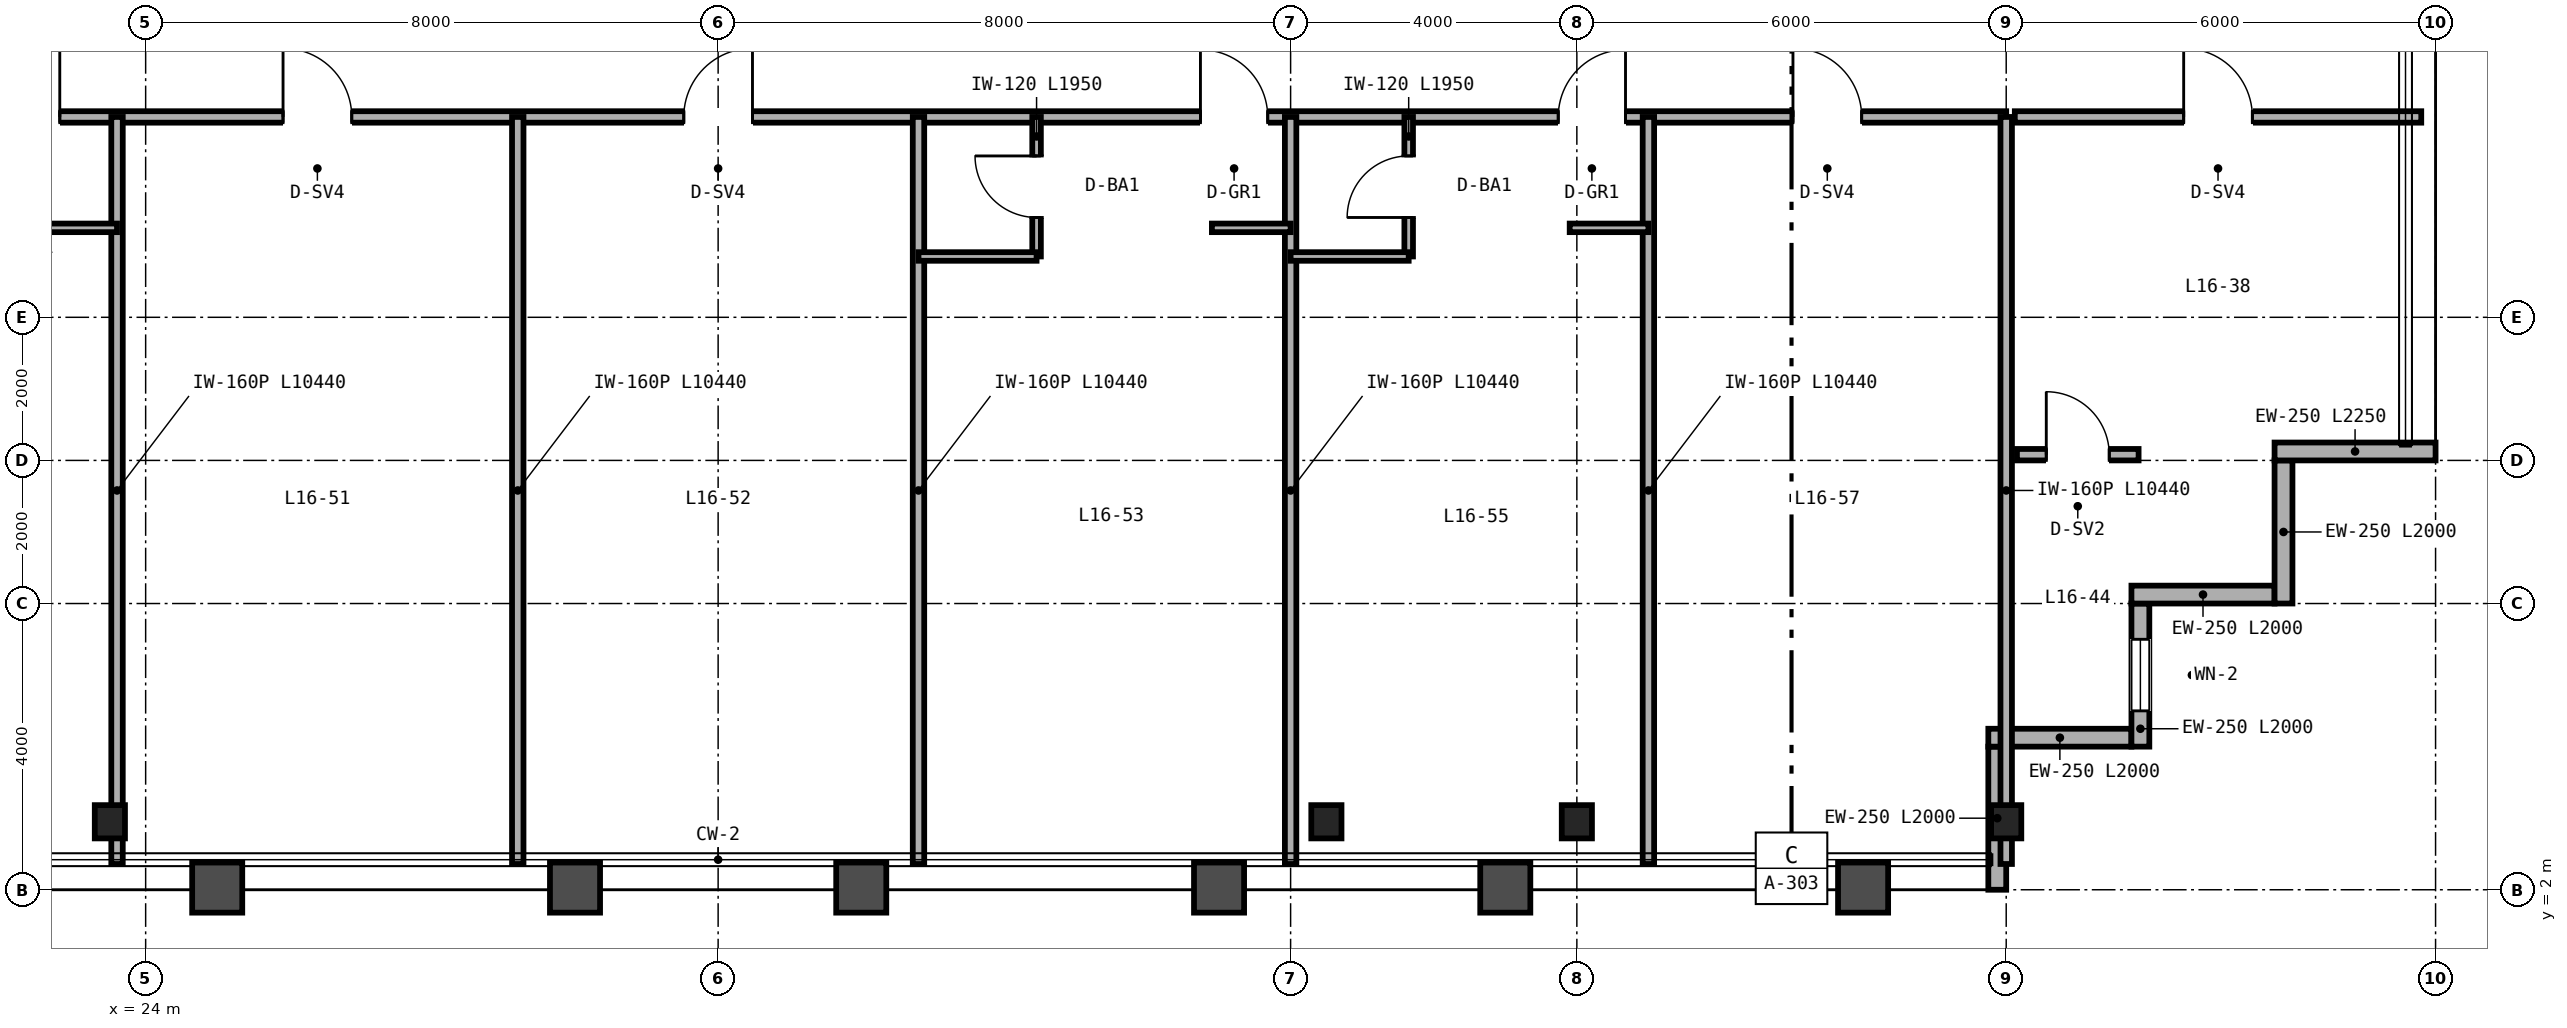
"""IFC4 building model, lengths in metres.
Left out: names, types, materials, properties, quantities, classifications, styles, units other than length and angle.
Written with IfcOpenShell. Run it as: python <this file> out.ifc"""

import sys

from ifc_helpers import new_model, si_unit, direction, frame, frame_2d, origin, origin_2d, place, context, subcontext, project, spatial, rectangle, i_section, extrude, source, transform, mapped, element, fill, save


model = new_model("IFC4")
c1 = context("Model", 3, precision=1e-05, world=origin(), true_north=direction((0.0, 1.0)))
c2 = subcontext(c1, "Body", "Model", "MODEL_VIEW")
j1 = project(units=[si_unit("LENGTHUNIT", "METRE"), si_unit("PLANEANGLEUNIT", "RADIAN")], contexts=[c1])
p1 = place(None, origin())
s1 = spatial("IfcSite", under=j1, at=p1, CompositionType="ELEMENT")
p2 = place(p1, origin())
s2 = spatial("IfcBuilding", under=s1, at=p2, CompositionType="ELEMENT")
p3 = place(p2, frame((0.0, 0.0, 67.2)))
s3 = spatial("IfcBuildingStorey", under=s2, at=p3, CompositionType="ELEMENT", Elevation=67.2)
m1 = source(origin(), c2, "Body", "SweptSolid", [
    extrude(i_section(OverallWidth=0.422, OverallDepth=0.465, WebThickness=0.045, FlangeThickness=0.073, FilletRadius=0.025, at=origin_2d()), origin(), (0.0, 0.0, 1.0), 3.35),
])
for number, where, z_axis, x_axis in (
    (1, (23.5, 2.95, 0.0), (0.0, 0.0, 1.0), (1.0, 0.0, 0.0)),
    (2, (40.5, 2.95, 0.0), (0.0, 0.0, 1.0), (1.0, 0.0, 0.0)),
    (3, (44.0, 2.95, 0.0), (0.0, 0.0, 1.0), (1.0, 0.0, 0.0)),
    (4, (50.0, 2.95, 0.0), (0.0, 0.0, 1.0), (1.0, 0.0, 0.0)),
):
    element("IfcColumn", number, at=place(p3, frame(where, z_axis=z_axis, x_axis=x_axis)), inside=s3, PredefinedType="COLUMN", context=c2, shape_type="MappedRepresentation", body=[
        mapped(m1, transform((0.0, 0.0, 0.0), scale=1.0)),
    ])
p4 = place(p3, frame((49.875, 2.0, 0.0), z_axis=(0.0, 0.0, 1.0), x_axis=(0.0, 1.0, 0.0)))
e5 = element("IfcWall", 5, at=p4, inside=s3, PredefinedType="SOLIDWALL", context=c2, shape_type="SweptSolid", body=[
    extrude(rectangle(XDim=2.0, YDim=0.25, at=frame_2d((1.0, 0.0))), origin(), (0.0, 0.0, 1.0), 2.657),
])
p5 = place(p3, frame((49.75, 4.125, 0.0), z_axis=(0.0, 0.0, 1.0), x_axis=(1.0, 0.0, 0.0)))
e6 = element("IfcWall", 6, at=p5, inside=s3, PredefinedType="SOLIDWALL", context=c2, shape_type="SweptSolid", body=[
    extrude(rectangle(XDim=2.0, YDim=0.25, at=frame_2d((1.0, 0.0))), origin(), (0.0, 0.0, 1.0), 3.35),
])
p6 = place(p3, frame((51.875, 4.0, 0.0), z_axis=(0.0, 0.0, 1.0), x_axis=(0.0, 1.0, 0.0)))
e7 = element("IfcWall", 7, at=p6, inside=s3, PredefinedType="SOLIDWALL", context=c2, shape_type="SweptSolid", body=[
    extrude(rectangle(XDim=2.0, YDim=0.25, at=frame_2d((1.0, 0.0))), origin(), (0.0, 0.0, 1.0), 3.35),
])
p7 = place(p6, frame((0.5, 0.0, 0.85)))
e8 = element("IfcOpeningElement", 8, at=p7, cuts=e7, PredefinedType="OPENING", context=c2, shape_type="SweptSolid", body=[
    extrude(rectangle(XDim=1.0, YDim=1.9, at=frame_2d((0.5, 0.95))), frame((0.0, 0.135, 0.0), z_axis=(0.0, -1.0, 0.0), x_axis=(1.0, 0.0, 0.0)), (0.0, 0.0, 1.0), 0.27),
])
for number, where, z_axis, x_axis in (
    (9, (51.75, 6.125, 0.0), (0.0, 0.0, 1.0), (1.0, 0.0, 0.0)),
    (10, (53.875, 6.0, 0.0), (0.0, 0.0, 1.0), (0.0, 1.0, 0.0)),
):
    element("IfcWall", number, at=place(p3, frame(where, z_axis=z_axis, x_axis=x_axis)), inside=s3, PredefinedType="SOLIDWALL", context=c2, shape_type="SweptSolid", body=[
        extrude(rectangle(XDim=2.0, YDim=0.25, at=frame_2d((1.0, 0.0))), origin(), (0.0, 0.0, 1.0), 3.35),
    ])
p8 = place(p3, frame((53.75, 8.125, 0.0), z_axis=(0.0, 0.0, 1.0), x_axis=(1.0, 0.0, 0.0)))
e11 = element("IfcWall", 11, at=p8, inside=s3, PredefinedType="SOLIDWALL", context=c2, shape_type="SweptSolid", body=[
    extrude(rectangle(XDim=2.25, YDim=0.25, at=frame_2d((1.125, 0.0))), origin(), (0.0, 0.0, 1.0), 3.35),
])
p9 = place(p3, frame((50.12, 12.8, 0.0), z_axis=(0.0, 0.0, 1.0), x_axis=(1.0, 0.0, 0.0)))
e12 = element("IfcWall", 12, at=p9, inside=s3, PredefinedType="PARTITIONING", context=c2, shape_type="SweptSolid", body=[
    extrude(rectangle(XDim=5.68, YDim=0.16, at=frame_2d((2.84, 0.0))), origin(), (0.0, 0.0, 1.0), 3.35),
])
p10 = place(p9, frame((2.36, 0.0, 0.0)))
e13 = element("IfcOpeningElement", 13, at=p10, cuts=e12, PredefinedType="OPENING", context=c2, shape_type="SweptSolid", body=[
    extrude(rectangle(XDim=0.96, YDim=2.15, at=frame_2d((0.48, 1.075))), frame((0.0, 0.09, 0.0), z_axis=(0.0, -1.0, 0.0), x_axis=(1.0, 0.0, 0.0)), (0.0, 0.0, 1.0), 0.18),
])
p11 = place(p3, frame((50.15, 8.08, 0.0), z_axis=(0.0, 0.0, 1.0), x_axis=(1.0, 0.0, 0.0)))
e14 = element("IfcWall", 14, at=p11, inside=s3, PredefinedType="PARTITIONING", context=c2, shape_type="SweptSolid", body=[
    extrude(rectangle(XDim=1.7, YDim=0.16, at=frame_2d((0.85, 0.0))), origin(), (0.0, 0.0, 1.0), 3.35),
])
p12 = place(p11, frame((0.41, 0.0, 0.0)))
e15 = element("IfcOpeningElement", 15, at=p12, cuts=e14, PredefinedType="OPENING", context=c2, shape_type="SweptSolid", body=[
    extrude(rectangle(XDim=0.88, YDim=2.15, at=frame_2d((0.44, 1.075))), frame((0.0, 0.09, 0.0), z_axis=(0.0, -1.0, 0.0), x_axis=(1.0, 0.0, 0.0)), (0.0, 0.0, 1.0), 0.18),
])
p13 = place(p3, frame((14.0, 12.8, 0.0), z_axis=(0.0, 0.0, 1.0), x_axis=(1.0, 0.0, 0.0)))
e16 = element("IfcWall", 16, at=p13, inside=s3, PredefinedType="PARTITIONING", context=c2, shape_type="SweptSolid", body=[
    extrude(rectangle(XDim=36.0, YDim=0.16, at=frame_2d((18.0, 0.0))), origin(), (0.0, 0.0, 1.0), 2.571),
])
p14 = place(p13, frame((3.54, 0.0, 0.0)))
e17 = element("IfcOpeningElement", 17, at=p14, cuts=e16, PredefinedType="OPENING", context=c2, shape_type="SweptSolid", body=[
    extrude(rectangle(XDim=0.94, YDim=2.15, at=frame_2d((0.47, 1.075))), frame((0.0, 0.09, 0.0), z_axis=(0.0, -1.0, 0.0), x_axis=(1.0, 0.0, 0.0)), (0.0, 0.0, 1.0), 0.18),
])
p15 = place(p13, frame((7.86, 0.0, 0.0)))
e18 = element("IfcOpeningElement", 18, at=p15, cuts=e16, PredefinedType="OPENING", context=c2, shape_type="SweptSolid", body=[
    extrude(rectangle(XDim=0.94, YDim=2.15, at=frame_2d((0.47, 1.075))), frame((0.0, 0.09, 0.0), z_axis=(0.0, -1.0, 0.0), x_axis=(1.0, 0.0, 0.0)), (0.0, 0.0, 1.0), 0.18),
])
p16 = place(p13, frame((11.92, 0.0, 0.0)))
e19 = element("IfcOpeningElement", 19, at=p16, cuts=e16, PredefinedType="OPENING", context=c2, shape_type="SweptSolid", body=[
    extrude(rectangle(XDim=0.96, YDim=2.15, at=frame_2d((0.48, 1.075))), frame((0.0, 0.09, 0.0), z_axis=(0.0, -1.0, 0.0), x_axis=(1.0, 0.0, 0.0)), (0.0, 0.0, 1.0), 0.18),
])
p17 = place(p13, frame((17.52, 0.0, 0.0)))
e20 = element("IfcOpeningElement", 20, at=p17, cuts=e16, PredefinedType="OPENING", context=c2, shape_type="SweptSolid", body=[
    extrude(rectangle(XDim=0.96, YDim=2.15, at=frame_2d((0.48, 1.075))), frame((0.0, 0.09, 0.0), z_axis=(0.0, -1.0, 0.0), x_axis=(1.0, 0.0, 0.0)), (0.0, 0.0, 1.0), 0.18),
])
p18 = place(p13, frame((24.74, 0.0, 0.0)))
e21 = element("IfcOpeningElement", 21, at=p18, cuts=e16, PredefinedType="OPENING", context=c2, shape_type="SweptSolid", body=[
    extrude(rectangle(XDim=0.94, YDim=2.15, at=frame_2d((0.47, 1.075))), frame((0.0, 0.09, 0.0), z_axis=(0.0, -1.0, 0.0), x_axis=(1.0, 0.0, 0.0)), (0.0, 0.0, 1.0), 0.18),
])
p19 = place(p13, frame((29.74, 0.0, 0.0)))
e22 = element("IfcOpeningElement", 22, at=p19, cuts=e16, PredefinedType="OPENING", context=c2, shape_type="SweptSolid", body=[
    extrude(rectangle(XDim=0.94, YDim=2.15, at=frame_2d((0.47, 1.075))), frame((0.0, 0.09, 0.0), z_axis=(0.0, -1.0, 0.0), x_axis=(1.0, 0.0, 0.0)), (0.0, 0.0, 1.0), 0.18),
])
p20 = place(p13, frame((33.02, 0.0, 0.0)))
e23 = element("IfcOpeningElement", 23, at=p20, cuts=e16, PredefinedType="OPENING", context=c2, shape_type="SweptSolid", body=[
    extrude(rectangle(XDim=0.96, YDim=2.15, at=frame_2d((0.48, 1.075))), frame((0.0, 0.09, 0.0), z_axis=(0.0, -1.0, 0.0), x_axis=(1.0, 0.0, 0.0)), (0.0, 0.0, 1.0), 0.18),
])
p21 = place(p3, frame((50.0, 2.36, 0.0), z_axis=(0.0, 0.0, 1.0), x_axis=(0.0, 1.0, 0.0)))
e24 = element("IfcWall", 24, at=p21, inside=s3, PredefinedType="PARTITIONING", context=c2, shape_type="SweptSolid", body=[
    extrude(rectangle(XDim=10.44, YDim=0.16, at=frame_2d((5.22, 0.0))), origin(), (0.0, 0.0, 1.0), 2.657),
])
p22 = place(p3, frame((23.6, 2.36, 0.0), z_axis=(0.0, 0.0, 1.0), x_axis=(0.0, 1.0, 0.0)))
e25 = element("IfcWall", 25, at=p22, inside=s3, PredefinedType="PARTITIONING", context=c2, shape_type="SweptSolid", body=[
    extrude(rectangle(XDim=10.44, YDim=0.16, at=frame_2d((5.22, 0.0))), origin(), (0.0, 0.0, 1.0), 2.423),
])
p23 = place(p3, frame((22.5, 11.25, 0.0), z_axis=(0.0, 0.0, 1.0), x_axis=(1.0, 0.0, 0.0)))
e26 = element("IfcWall", 26, at=p23, inside=s3, PredefinedType="PARTITIONING", context=c2, shape_type="SweptSolid", body=[
    extrude(rectangle(XDim=1.1, YDim=0.12, at=frame_2d((0.55, 0.0))), origin(), (0.0, 0.0, 1.0), 2.571),
])
for number, where, z_axis, x_axis in (
    (27, (29.2, 2.36, 0.0), (0.0, 0.0, 1.0), (0.0, 1.0, 0.0)),
    (28, (34.8, 2.36, 0.0), (0.0, 0.0, 1.0), (0.0, 1.0, 0.0)),
    (29, (40.0, 2.36, 0.0), (0.0, 0.0, 1.0), (0.0, 1.0, 0.0)),
):
    element("IfcWall", number, at=place(p3, frame(where, z_axis=z_axis, x_axis=x_axis)), inside=s3, PredefinedType="PARTITIONING", context=c2, shape_type="SweptSolid", body=[
        extrude(rectangle(XDim=10.44, YDim=0.16, at=frame_2d((5.22, 0.0))), origin(), (0.0, 0.0, 1.0), 2.423),
    ])
p24 = place(p3, frame((36.45, 10.85, 0.0), z_axis=(0.0, 0.0, 1.0), x_axis=(0.0, 1.0, 0.0)))
e30 = element("IfcWall", 30, at=p24, inside=s3, PredefinedType="PARTITIONING", context=c2, shape_type="SweptSolid", body=[
    extrude(rectangle(XDim=1.95, YDim=0.12, at=frame_2d((0.975, 0.0))), origin(), (0.0, 0.0, 1.0), 3.35),
])
p25 = place(p24, frame((0.545, 0.0, 0.0)))
e31 = element("IfcOpeningElement", 31, at=p25, cuts=e30, PredefinedType="OPENING", context=c2, shape_type="SweptSolid", body=[
    extrude(rectangle(XDim=0.86, YDim=2.1, at=frame_2d((0.43, 1.05))), frame((0.0, 0.07, 0.0), z_axis=(0.0, -1.0, 0.0), x_axis=(1.0, 0.0, 0.0)), (0.0, 0.0, 1.0), 0.14),
])
p26 = place(p3, frame((34.8, 10.85, 0.0), z_axis=(0.0, 0.0, 1.0), x_axis=(1.0, 0.0, 0.0)))
e32 = element("IfcWall", 32, at=p26, inside=s3, PredefinedType="PARTITIONING", context=c2, shape_type="SweptSolid", body=[
    extrude(rectangle(XDim=1.65, YDim=0.12, at=frame_2d((0.825, 0.0))), origin(), (0.0, 0.0, 1.0), 3.35),
])
p27 = place(p3, frame((38.9, 11.25, 0.0), z_axis=(0.0, 0.0, 1.0), x_axis=(1.0, 0.0, 0.0)))
e33 = element("IfcWall", 33, at=p27, inside=s3, PredefinedType="PARTITIONING", context=c2, shape_type="SweptSolid", body=[
    extrude(rectangle(XDim=1.1, YDim=0.12, at=frame_2d((0.55, 0.0))), origin(), (0.0, 0.0, 1.0), 3.35),
])
p28 = place(p3, frame((45.0, 2.36, 0.0), z_axis=(0.0, 0.0, 1.0), x_axis=(0.0, 1.0, 0.0)))
e34 = element("IfcWall", 34, at=p28, inside=s3, PredefinedType="PARTITIONING", context=c2, shape_type="SweptSolid", body=[
    extrude(rectangle(XDim=10.44, YDim=0.16, at=frame_2d((5.22, 0.0))), origin(), (0.0, 0.0, 1.0), 2.657),
])
p29 = place(p3, frame((41.65, 10.85, 0.0), z_axis=(0.0, 0.0, 1.0), x_axis=(0.0, 1.0, 0.0)))
e35 = element("IfcWall", 35, at=p29, inside=s3, PredefinedType="PARTITIONING", context=c2, shape_type="SweptSolid", body=[
    extrude(rectangle(XDim=1.95, YDim=0.12, at=frame_2d((0.975, 0.0))), origin(), (0.0, 0.0, 1.0), 3.35),
])
p30 = place(p29, frame((0.545, 0.0, 0.0)))
e36 = element("IfcOpeningElement", 36, at=p30, cuts=e35, PredefinedType="OPENING", context=c2, shape_type="SweptSolid", body=[
    extrude(rectangle(XDim=0.86, YDim=2.1, at=frame_2d((0.43, 1.05))), frame((0.0, 0.07, 0.0), z_axis=(0.0, -1.0, 0.0), x_axis=(1.0, 0.0, 0.0)), (0.0, 0.0, 1.0), 0.14),
])
p31 = place(p3, frame((40.0, 10.85, 0.0), z_axis=(0.0, 0.0, 1.0), x_axis=(1.0, 0.0, 0.0)))
e37 = element("IfcWall", 37, at=p31, inside=s3, PredefinedType="PARTITIONING", context=c2, shape_type="SweptSolid", body=[
    extrude(rectangle(XDim=1.65, YDim=0.12, at=frame_2d((0.825, 0.0))), origin(), (0.0, 0.0, 1.0), 2.571),
])
p32 = place(p3, frame((43.9, 11.25, 0.0), z_axis=(0.0, 0.0, 1.0), x_axis=(1.0, 0.0, 0.0)))
e38 = element("IfcWall", 38, at=p32, inside=s3, PredefinedType="PARTITIONING", context=c2, shape_type="SweptSolid", body=[
    extrude(rectangle(XDim=1.1, YDim=0.12, at=frame_2d((0.55, 0.0))), origin(), (0.0, 0.0, 1.0), 3.35),
])
m2 = source(origin(), c2, "Body", "SweptSolid", [
    extrude(rectangle(XDim=1.0, YDim=1.9, at=frame_2d((0.5, 0.95))), frame((0.0, 0.03, 0.0), z_axis=(0.0, -1.0, 0.0), x_axis=(1.0, 0.0, 0.0)), (0.0, 0.0, 1.0), 0.06),
])
p33 = place(p7, origin())
e39 = element("IfcWindow", 39, at=p33, inside=s3, PartitioningType="SINGLE_PANEL", PredefinedType="WINDOW", context=c2, shape_type="MappedRepresentation", body=[
    mapped(m2, transform((0.0, 0.0, 0.0), scale=1.0)),
])
fill(e8, e39)
m3 = source(origin(), c2, "Body", "SweptSolid", [
    extrude(rectangle(XDim=0.96, YDim=2.15, at=frame_2d((0.48, 1.075))), frame((0.0, 0.025, 0.0), z_axis=(0.0, -1.0, 0.0), x_axis=(1.0, 0.0, 0.0)), (0.0, 0.0, 1.0), 0.05),
])
p34 = place(p10, origin())
e40 = element("IfcDoor", 40, at=p34, inside=s3, OperationType="SINGLE_SWING_LEFT", PredefinedType="DOOR", context=c2, shape_type="MappedRepresentation", body=[
    mapped(m3, transform((0.0, 0.0, 0.0), scale=1.0)),
])
fill(e13, e40)
m4 = source(origin(), c2, "Body", "SweptSolid", [
    extrude(rectangle(XDim=0.88, YDim=2.15, at=frame_2d((0.44, 1.075))), frame((0.0, 0.025, 0.0), z_axis=(0.0, -1.0, 0.0), x_axis=(1.0, 0.0, 0.0)), (0.0, 0.0, 1.0), 0.05),
])
p35 = place(p12, origin())
e41 = element("IfcDoor", 41, at=p35, inside=s3, OperationType="SINGLE_SWING_LEFT", PredefinedType="DOOR", context=c2, shape_type="MappedRepresentation", body=[
    mapped(m4, transform((0.0, 0.0, 0.0), scale=1.0)),
])
fill(e15, e41)
m5 = source(origin(), c2, "Body", "SweptSolid", [
    extrude(rectangle(XDim=0.86, YDim=2.1, at=frame_2d((0.43, 1.05))), frame((0.0, 0.025, 0.0), z_axis=(0.0, -1.0, 0.0), x_axis=(1.0, 0.0, 0.0)), (0.0, 0.0, 1.0), 0.05),
])
p36 = place(p25, origin())
e42 = element("IfcDoor", 42, at=p36, inside=s3, OperationType="SINGLE_SWING_RIGHT", PredefinedType="DOOR", context=c2, shape_type="MappedRepresentation", body=[
    mapped(m5, transform((0.0, 0.0, 0.0), scale=1.0)),
])
fill(e31, e42)
p37 = place(p30, origin())
e43 = element("IfcDoor", 43, at=p37, inside=s3, OperationType="SINGLE_SWING_LEFT", PredefinedType="DOOR", context=c2, shape_type="MappedRepresentation", body=[
    mapped(m5, transform((0.0, 0.0, 0.0), scale=1.0)),
])
fill(e36, e43)
m6 = source(origin(), c2, "Body", "SweptSolid", [
    extrude(rectangle(XDim=0.94, YDim=2.15, at=frame_2d((0.47, 1.075))), frame((0.0, 0.025, 0.0), z_axis=(0.0, -1.0, 0.0), x_axis=(1.0, 0.0, 0.0)), (0.0, 0.0, 1.0), 0.05),
])
p38 = place(p15, origin())
e44 = element("IfcDoor", 44, at=p38, inside=s3, OperationType="SINGLE_SWING_RIGHT", PredefinedType="DOOR", context=c2, shape_type="MappedRepresentation", body=[
    mapped(m6, transform((0.0, 0.0, 0.0), scale=1.0)),
])
fill(e18, e44)
p39 = place(p16, origin())
e45 = element("IfcDoor", 45, at=p39, inside=s3, OperationType="SINGLE_SWING_LEFT", PredefinedType="DOOR", context=c2, shape_type="MappedRepresentation", body=[
    mapped(m3, transform((0.0, 0.0, 0.0), scale=1.0)),
])
fill(e19, e45)
p40 = place(p17, origin())
e46 = element("IfcDoor", 46, at=p40, inside=s3, OperationType="SINGLE_SWING_RIGHT", PredefinedType="DOOR", context=c2, shape_type="MappedRepresentation", body=[
    mapped(m3, transform((0.0, 0.0, 0.0), scale=1.0)),
])
fill(e20, e46)
p41 = place(p18, origin())
e47 = element("IfcDoor", 47, at=p41, inside=s3, OperationType="SINGLE_SWING_LEFT", PredefinedType="DOOR", context=c2, shape_type="MappedRepresentation", body=[
    mapped(m6, transform((0.0, 0.0, 0.0), scale=1.0)),
])
fill(e21, e47)
p42 = place(p19, origin())
e48 = element("IfcDoor", 48, at=p42, inside=s3, OperationType="SINGLE_SWING_RIGHT", PredefinedType="DOOR", context=c2, shape_type="MappedRepresentation", body=[
    mapped(m6, transform((0.0, 0.0, 0.0), scale=1.0)),
])
fill(e22, e48)
p43 = place(p20, origin())
e49 = element("IfcDoor", 49, at=p43, inside=s3, OperationType="SINGLE_SWING_LEFT", PredefinedType="DOOR", context=c2, shape_type="MappedRepresentation", body=[
    mapped(m3, transform((0.0, 0.0, 0.0), scale=1.0)),
])
fill(e23, e49)
save(model, sys.argv[1])
